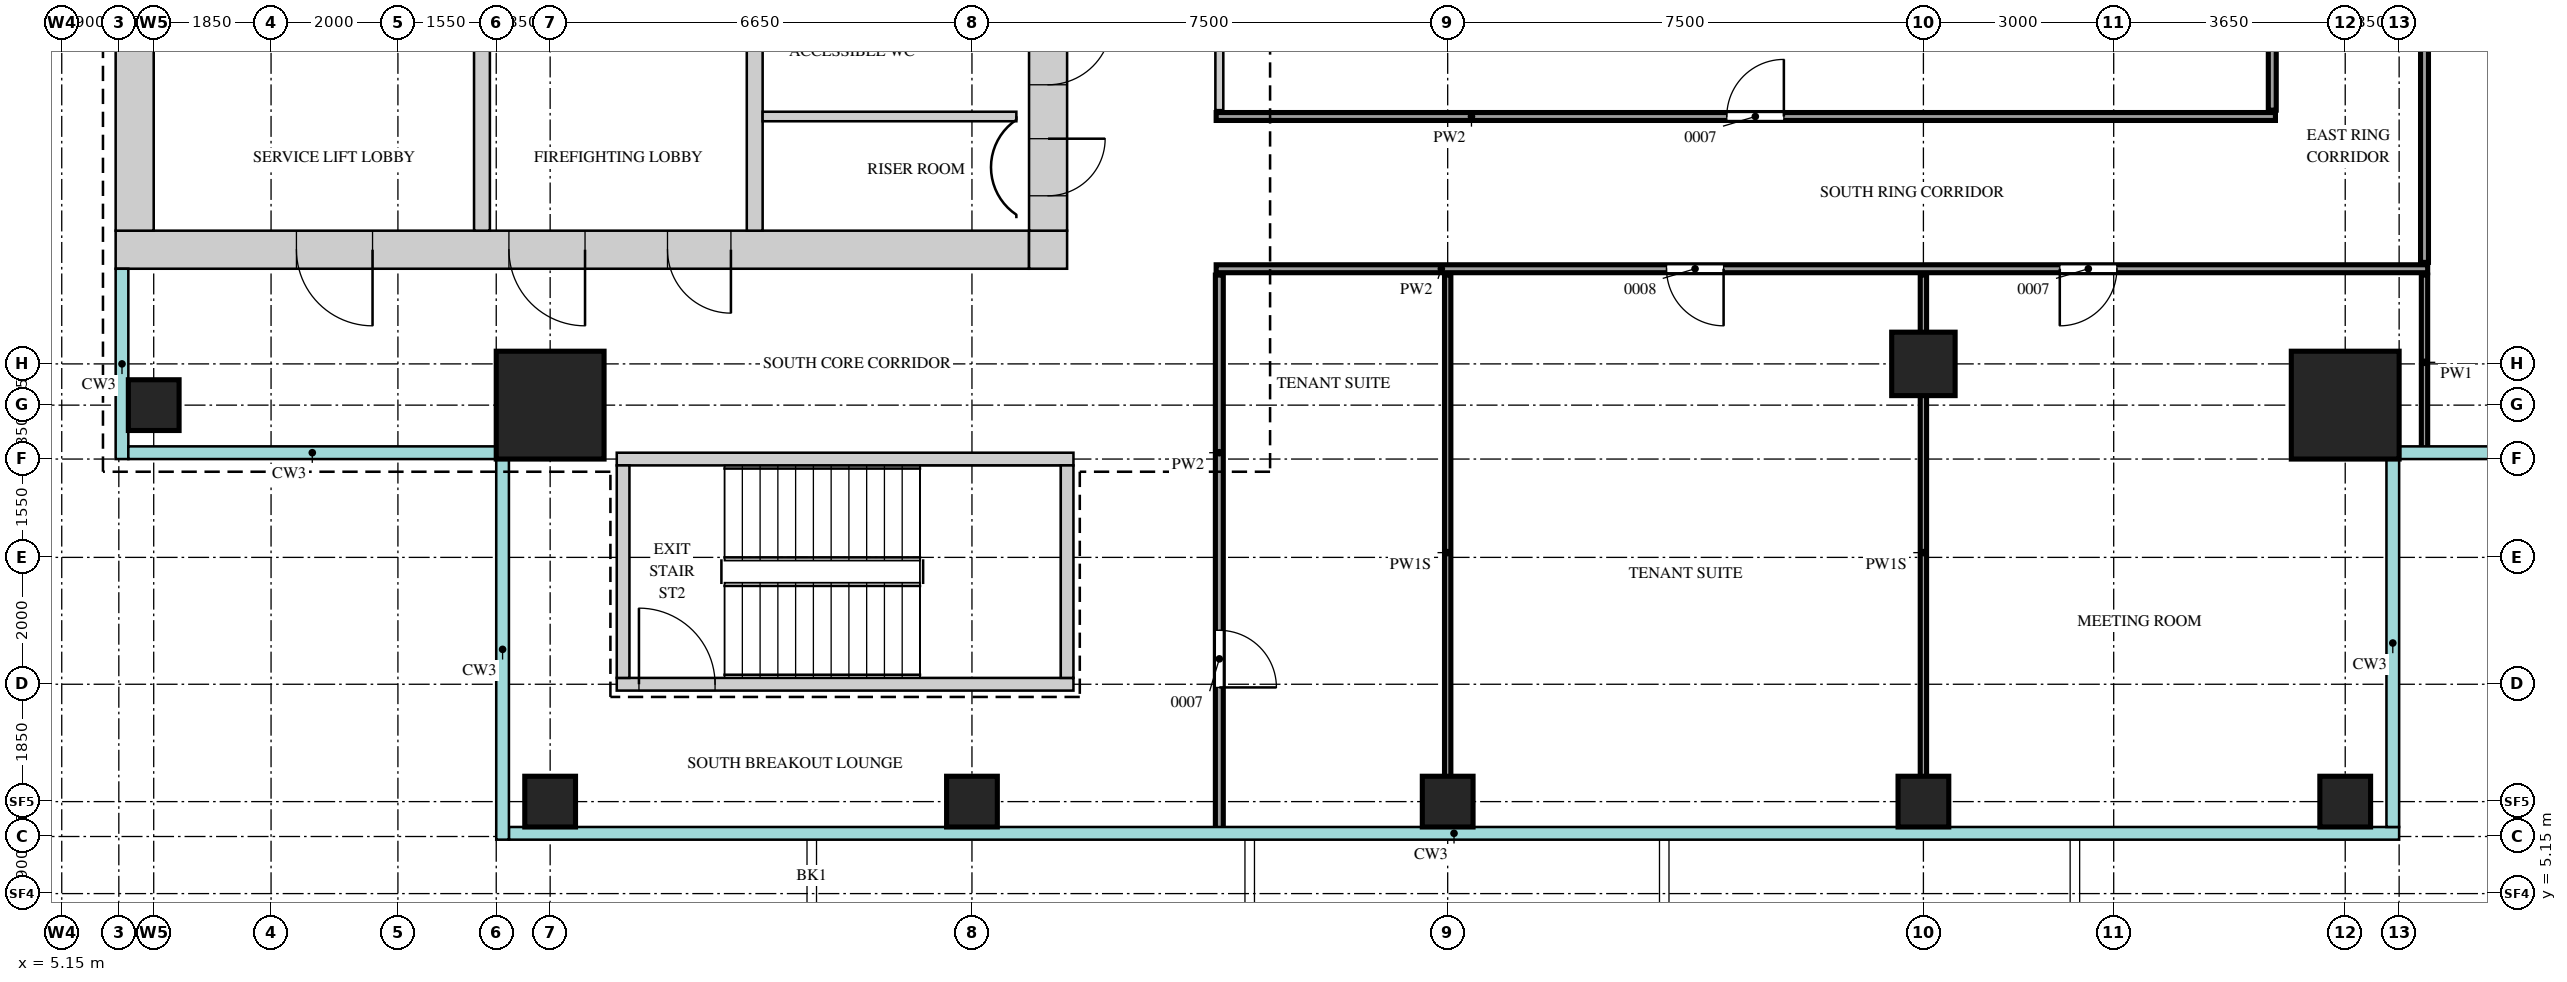
"""IFC4 building model, lengths in metres.
Left out: names, types, materials, properties, quantities, classifications, styles, units other than length and angle.
Written with IfcOpenShell. Run it as: python <this file> out.ifc"""

import sys

from ifc_helpers import new_model, si_unit, direction, frame, frame_2d, origin, origin_2d, place, context, subcontext, project, spatial, rectangle, extrude, source, transform, mapped, element, fill, save


model = new_model("IFC4")
c1 = context("Model", 3, precision=1e-05, world=origin(), true_north=direction((0.0, 1.0)))
c2 = subcontext(c1, "Body", "Model", "MODEL_VIEW")
j1 = project(units=[si_unit("LENGTHUNIT", "METRE"), si_unit("PLANEANGLEUNIT", "RADIAN")], contexts=[c1])
p1 = place(None, origin())
s1 = spatial("IfcSite", under=j1, at=p1, CompositionType="ELEMENT")
p2 = place(p1, origin())
s2 = spatial("IfcBuilding", under=s1, at=p2, CompositionType="ELEMENT")
p3 = place(p2, frame((0.0, 0.0, 286.2)))
s3 = spatial("IfcBuildingStorey", under=s2, at=p3, CompositionType="ELEMENT", Elevation=286.2)
m1 = source(origin(), c2, "Body", "SweptSolid", [
    extrude(rectangle(XDim=14.4, YDim=0.6, at=frame_2d((7.2, 0.0))), origin(), (0.0, 0.0, 1.0), 3.75),
])
p4 = place(p3, frame((6.0, 15.3, 0.0), z_axis=(0.0, 0.0, 1.0), x_axis=(1.0, 0.0, 0.0)))
e1 = element("IfcWall", 1, at=p4, inside=s3, PredefinedType="SHEAR", context=c2, shape_type="MappedRepresentation", body=[
    mapped(m1, transform((0.0, 0.0, 0.0))),
])
m2 = source(origin(), c2, "Body", "SweptSolid", [
    extrude(rectangle(XDim=1.2, YDim=2.1, at=frame_2d((0.6, 1.05))), frame((0.0, 0.31, 0.0), z_axis=(0.0, -1.0, 0.0), x_axis=(1.0, 0.0, 0.0)), (0.0, 0.0, 1.0), 0.62),
])
p5 = place(p4, frame((6.2, 0.0, 0.0)))
e2 = element("IfcOpeningElement", 2, at=p5, cuts=e1, PredefinedType="OPENING", context=c2, shape_type="MappedRepresentation", body=[
    mapped(m2, transform((0.0, 0.0, 0.0))),
])
p6 = place(p4, frame((2.85, 0.0, 0.0)))
e3 = element("IfcOpeningElement", 3, at=p6, cuts=e1, PredefinedType="OPENING", context=c2, shape_type="MappedRepresentation", body=[
    mapped(m2, transform((0.0, 0.0, 0.0))),
])
m3 = source(origin(), c2, "Body", "SweptSolid", [
    extrude(rectangle(XDim=1.0, YDim=2.1, at=frame_2d((0.5, 1.05))), frame((0.0, 0.31, 0.0), z_axis=(0.0, -1.0, 0.0), x_axis=(1.0, 0.0, 0.0)), (0.0, 0.0, 1.0), 0.62),
])
p7 = place(p4, frame((8.7, 0.0, 0.0)))
e4 = element("IfcOpeningElement", 4, at=p7, cuts=e1, PredefinedType="OPENING", context=c2, shape_type="MappedRepresentation", body=[
    mapped(m3, transform((0.0, 0.0, 0.0))),
])
m4 = source(origin(), c2, "Body", "SweptSolid", [
    extrude(rectangle(XDim=0.6, YDim=0.6, at=frame_2d((0.3, 0.0))), origin(), (0.0, 0.0, 1.0), 3.75),
])
p8 = place(p3, frame((20.4, 15.3, 0.0), z_axis=(0.0, 0.0, 1.0), x_axis=(1.0, 0.0, 0.0)))
e5 = element("IfcWall", 5, at=p8, inside=s3, PredefinedType="SHEAR", context=c2, shape_type="MappedRepresentation", body=[
    mapped(m4, transform((0.0, 0.0, 0.0))),
])
m5 = source(origin(), c2, "Body", "SweptSolid", [
    extrude(rectangle(XDim=22.8, YDim=0.6, at=frame_2d((11.4, 0.0))), origin(), (0.0, 0.0, 1.0), 3.75),
])
p9 = place(p3, frame((20.7, 15.6, 0.0), z_axis=(0.0, 0.0, 1.0), x_axis=(0.0, 1.0, 0.0)))
e6 = element("IfcWall", 6, at=p9, inside=s3, PredefinedType="SHEAR", context=c2, shape_type="MappedRepresentation", body=[
    mapped(m5, transform((0.0, 0.0, 0.0))),
])
m6 = source(origin(), c2, "Body", "SweptSolid", [
    extrude(rectangle(XDim=1.8, YDim=2.1, at=frame_2d((0.9, 1.05))), frame((0.0, 0.31, 0.0), z_axis=(0.0, -1.0, 0.0), x_axis=(1.0, 0.0, 0.0)), (0.0, 0.0, 1.0), 0.62),
])
p10 = place(p9, frame((10.9, 0.0, 0.0)))
e7 = element("IfcOpeningElement", 7, at=p10, cuts=e6, PredefinedType="OPENING", context=c2, shape_type="MappedRepresentation", body=[
    mapped(m6, transform((0.0, 0.0, 0.0))),
])
m7 = source(origin(), c2, "Body", "SweptSolid", [
    extrude(rectangle(XDim=0.9, YDim=2.1, at=frame_2d((0.45, 1.05))), frame((0.0, 0.31, 0.0), z_axis=(0.0, -1.0, 0.0), x_axis=(1.0, 0.0, 0.0)), (0.0, 0.0, 1.0), 0.62),
])
p11 = place(p9, frame((0.55, 0.0, 0.0)))
e8 = element("IfcOpeningElement", 8, at=p11, cuts=e6, PredefinedType="OPENING", context=c2, shape_type="MappedRepresentation", body=[
    mapped(m7, transform((0.0, 0.0, 0.0))),
])
p12 = place(p9, frame((2.3, 0.0, 0.0)))
e9 = element("IfcOpeningElement", 9, at=p12, cuts=e6, PredefinedType="OPENING", context=c2, shape_type="MappedRepresentation", body=[
    mapped(m3, transform((0.0, 0.0, 0.0))),
])
p13 = place(p9, frame((5.1, 0.0, 0.0)))
e10 = element("IfcOpeningElement", 10, at=p13, cuts=e6, PredefinedType="OPENING", context=c2, shape_type="MappedRepresentation", body=[
    mapped(m7, transform((0.0, 0.0, 0.0))),
])
p14 = place(p3, frame((6.3, 15.6, 0.0), z_axis=(0.0, 0.0, 1.0), x_axis=(0.0, 1.0, 0.0)))
e11 = element("IfcWall", 11, at=p14, inside=s3, PredefinedType="SHEAR", context=c2, shape_type="MappedRepresentation", body=[
    mapped(m5, transform((0.0, 0.0, 0.0))),
])
m8 = source(origin(), c2, "Body", "SweptSolid", [
    extrude(rectangle(XDim=7.2, YDim=0.2, at=frame_2d((3.6, 0.0))), origin(), (0.0, 0.0, 1.0), 3.75),
])
p15 = place(p3, frame((13.9, 12.0, 0.0), z_axis=(0.0, 0.0, 1.0), x_axis=(1.0, 0.0, 0.0)))
e12 = element("IfcWall", 12, at=p15, inside=s3, PredefinedType="SHEAR", context=c2, shape_type="MappedRepresentation", body=[
    mapped(m8, transform((0.0, 0.0, 0.0))),
])
p16 = place(p3, frame((13.9, 8.45, 0.0), z_axis=(0.0, 0.0, 1.0), x_axis=(1.0, 0.0, 0.0)))
e13 = element("IfcWall", 13, at=p16, inside=s3, PredefinedType="SHEAR", context=c2, shape_type="MappedRepresentation", body=[
    mapped(m8, transform((0.0, 0.0, 0.0))),
])
m9 = source(origin(), c2, "Body", "SweptSolid", [
    extrude(rectangle(XDim=1.2, YDim=2.1, at=frame_2d((0.6, 1.05))), frame((0.0, 0.11, 0.0), z_axis=(0.0, -1.0, 0.0), x_axis=(1.0, 0.0, 0.0)), (0.0, 0.0, 1.0), 0.22),
])
p17 = place(p16, frame((0.35, 0.0, 0.0)))
e14 = element("IfcOpeningElement", 14, at=p17, cuts=e13, PredefinedType="OPENING", context=c2, shape_type="MappedRepresentation", body=[
    mapped(m9, transform((0.0, 0.0, 0.0))),
])
m10 = source(origin(), c2, "Body", "SweptSolid", [
    extrude(rectangle(XDim=3.35, YDim=0.2, at=frame_2d((1.675, 0.0))), origin(), (0.0, 0.0, 1.0), 3.75),
])
for number, where, z_axis, x_axis in (
    (15, (21.0, 8.55, 0.0), (0.0, 0.0, 1.0), (0.0, 1.0, 0.0)),
    (16, (14.0, 8.55, 0.0), (0.0, 0.0, 1.0), (0.0, 1.0, 0.0)),
):
    element("IfcWall", number, at=place(p3, frame(where, z_axis=z_axis, x_axis=x_axis)), inside=s3, PredefinedType="SHEAR", context=c2, shape_type="MappedRepresentation", body=[
        mapped(m10, transform((0.0, 0.0, 0.0))),
    ])
m11 = source(origin(), c2, "Body", "SweptSolid", [
    extrude(rectangle(XDim=3.6, YDim=0.25, at=frame_2d((1.8, 0.0))), origin(), (0.0, 0.0, 1.0), 3.75),
])
for number, where, z_axis, x_axis in (
    (17, (16.075, 15.6, 0.0), (0.0, 0.0, 1.0), (0.0, 1.0, 0.0)),
    (18, (11.775, 15.6, 0.0), (0.0, 0.0, 1.0), (0.0, 1.0, 0.0)),
):
    element("IfcWall", number, at=place(p3, frame(where, z_axis=z_axis, x_axis=x_axis)), inside=s3, PredefinedType="STANDARD", context=c2, shape_type="MappedRepresentation", body=[
        mapped(m11, transform((0.0, 0.0, 0.0))),
    ])
m12 = source(origin(), c2, "Body", "SweptSolid", [
    extrude(rectangle(XDim=1.7, YDim=1.7, at=origin_2d()), origin(), (0.0, 0.0, 1.0), 3.75),
])
for number, where, z_axis, x_axis in (
    (19, (41.15, 12.85, 0.0), (0.0, 0.0, 1.0), (1.0, 0.0, 0.0)),
    (20, (12.85, 12.85, 0.0), (0.0, 0.0, 1.0), (1.0, 0.0, 0.0)),
):
    element("IfcColumn", number, at=place(p3, frame(where, z_axis=z_axis, x_axis=x_axis)), inside=s3, PredefinedType="COLUMN", context=c2, shape_type="MappedRepresentation", body=[
        mapped(m12, transform((0.0, 0.0, 0.0))),
    ])
m13 = source(origin(), c2, "Body", "SweptSolid", [
    extrude(rectangle(XDim=0.8, YDim=0.8, at=origin_2d()), origin(), (0.0, 0.0, 1.0), 3.75),
])
for number, where, z_axis, x_axis in (
    (21, (12.85, 6.6, 0.0), (0.0, 0.0, 1.0), (1.0, 0.0, 0.0)),
    (22, (19.5, 6.6, 0.0), (0.0, 0.0, 1.0), (1.0, 0.0, 0.0)),
    (23, (27.0, 6.6, 0.0), (0.0, 0.0, 1.0), (1.0, 0.0, 0.0)),
    (24, (34.5, 6.6, 0.0), (0.0, 0.0, 1.0), (1.0, 0.0, 0.0)),
    (25, (41.15, 6.6, 0.0), (0.0, 0.0, 1.0), (1.0, 0.0, 0.0)),
    (26, (6.6, 12.85, 0.0), (0.0, 0.0, 1.0), (1.0, 0.0, 0.0)),
):
    element("IfcColumn", number, at=place(p3, frame(where, z_axis=z_axis, x_axis=x_axis)), inside=s3, PredefinedType="COLUMN", context=c2, shape_type="MappedRepresentation", body=[
        mapped(m13, transform((0.0, 0.0, 0.0))),
    ])
m14 = source(origin(), c2, "Body", "SweptSolid", [
    extrude(rectangle(XDim=1.0, YDim=1.0, at=origin_2d()), origin(), (0.0, 0.0, 1.0), 3.75),
])
p18 = place(p3, frame((34.5, 13.5, 0.0), z_axis=(0.0, 0.0, 1.0), x_axis=(1.0, 0.0, 0.0)))
e27 = element("IfcColumn", 27, at=p18, inside=s3, PredefinedType="COLUMN", context=c2, shape_type="MappedRepresentation", body=[
    mapped(m14, transform((0.0, 0.0, 0.0))),
])
m15 = source(origin(), c2, "Body", "SweptSolid", [
    extrude(rectangle(XDim=8.75, YDim=0.125, at=frame_2d((4.375, 0.0))), origin(), (0.0, 0.0, 1.0), 3.8),
])
p19 = place(p3, frame((23.4, 6.15, 0.0), z_axis=(0.0, 0.0, 1.0), x_axis=(0.0, 1.0, 0.0)))
e28 = element("IfcWall", 28, at=p19, inside=s3, PredefinedType="PARTITIONING", context=c2, shape_type="MappedRepresentation", body=[
    mapped(m15, transform((0.0, 0.0, 0.0))),
])
m16 = source(origin(), c2, "Body", "SweptSolid", [
    extrude(rectangle(XDim=0.9, YDim=2.1, at=frame_2d((0.45, 1.05))), frame((0.0, 0.073, 0.0), z_axis=(0.0, -1.0, 0.0), x_axis=(1.0, 0.0, 0.0)), (0.0, 0.0, 1.0), 0.145),
])
p20 = place(p19, frame((2.25, 0.0, 0.0)))
e29 = element("IfcOpeningElement", 29, at=p20, cuts=e28, PredefinedType="OPENING", context=c2, shape_type="MappedRepresentation", body=[
    mapped(m16, transform((0.0, 0.0, 0.0))),
])
m17 = source(origin(), c2, "Body", "SweptSolid", [
    extrude(rectangle(XDim=8.75, YDim=0.1, at=frame_2d((4.375, 0.0))), origin(), (0.0, 0.0, 1.0), 3.35),
])
for number, where, z_axis, x_axis in (
    (30, (27.0, 6.15, 0.0), (0.0, 0.0, 1.0), (0.0, 1.0, 0.0)),
    (31, (34.5, 6.15, 0.0), (0.0, 0.0, 1.0), (0.0, 1.0, 0.0)),
):
    element("IfcWall", number, at=place(p3, frame(where, z_axis=z_axis, x_axis=x_axis)), inside=s3, PredefinedType="PARTITIONING", context=c2, shape_type="MappedRepresentation", body=[
        mapped(m17, transform((0.0, 0.0, 0.0))),
    ])
m18 = source(origin(), c2, "Body", "SweptSolid", [
    extrude(rectangle(XDim=2.75, YDim=0.1, at=frame_2d((1.375, 0.0))), origin(), (0.0, 0.0, 1.0), 3.8),
])
p21 = place(p3, frame((42.4, 12.15, 0.0), z_axis=(0.0, 0.0, 1.0), x_axis=(0.0, 1.0, 0.0)))
e32 = element("IfcWall", 32, at=p21, inside=s3, PredefinedType="PARTITIONING", context=c2, shape_type="MappedRepresentation", body=[
    mapped(m18, transform((0.0, 0.0, 0.0))),
])
m19 = source(origin(), c2, "Body", "SweptSolid", [
    extrude(rectangle(XDim=19.1, YDim=0.125, at=frame_2d((9.55, 0.0))), origin(), (0.0, 0.0, 1.0), 3.8),
])
p22 = place(p3, frame((23.35, 15.0, 0.0), z_axis=(0.0, 0.0, 1.0), x_axis=(1.0, 0.0, 0.0)))
e33 = element("IfcWall", 33, at=p22, inside=s3, PredefinedType="PARTITIONING", context=c2, shape_type="MappedRepresentation", body=[
    mapped(m19, transform((0.0, 0.0, 0.0))),
])
p23 = place(p22, frame((7.1, 0.0, 0.0)))
e34 = element("IfcOpeningElement", 34, at=p23, cuts=e33, PredefinedType="OPENING", context=c2, shape_type="MappedRepresentation", body=[
    mapped(m16, transform((0.0, 0.0, 0.0))),
])
p24 = place(p22, frame((13.3, 0.0, 0.0)))
e35 = element("IfcOpeningElement", 35, at=p24, cuts=e33, PredefinedType="OPENING", context=c2, shape_type="MappedRepresentation", body=[
    mapped(m16, transform((0.0, 0.0, 0.0))),
])
m20 = source(origin(), c2, "Body", "SweptSolid", [
    extrude(rectangle(XDim=23.8, YDim=0.125, at=frame_2d((11.9, 0.0))), origin(), (0.0, 0.0, 1.0), 3.8),
])
p25 = place(p3, frame((42.4, 15.1, 0.0), z_axis=(0.0, 0.0, 1.0), x_axis=(0.0, 1.0, 0.0)))
e36 = element("IfcWall", 36, at=p25, inside=s3, PredefinedType="PARTITIONING", context=c2, shape_type="MappedRepresentation", body=[
    mapped(m20, transform((0.0, 0.0, 0.0))),
])
p26 = place(p25, frame((5.3, 0.0, 0.0)))
e37 = element("IfcOpeningElement", 37, at=p26, cuts=e36, PredefinedType="OPENING", context=c2, shape_type="MappedRepresentation", body=[
    mapped(m16, transform((0.0, 0.0, 0.0))),
])
p27 = place(p25, frame((15.35, 0.0, 0.0)))
e38 = element("IfcOpeningElement", 38, at=p27, cuts=e36, PredefinedType="OPENING", context=c2, shape_type="MappedRepresentation", body=[
    mapped(m16, transform((0.0, 0.0, 0.0))),
])
p28 = place(p25, frame((21.05, 0.0, 0.0)))
e39 = element("IfcOpeningElement", 39, at=p28, cuts=e36, PredefinedType="OPENING", context=c2, shape_type="MappedRepresentation", body=[
    mapped(m16, transform((0.0, 0.0, 0.0))),
])
m21 = source(origin(), c2, "Body", "SweptSolid", [
    extrude(rectangle(XDim=4.0, YDim=0.15, at=frame_2d((2.0, 0.0))), origin(), (0.0, 0.0, 1.0), 3.8),
])
p29 = place(p3, frame((16.2, 17.4, 0.0), z_axis=(0.0, 0.0, 1.0), x_axis=(1.0, 0.0, 0.0)))
e40 = element("IfcWall", 40, at=p29, inside=s3, PredefinedType="PARTITIONING", context=c2, shape_type="MappedRepresentation", body=[
    mapped(m21, transform((0.0, 0.0, 0.0))),
])
m22 = source(origin(), c2, "Body", "SweptSolid", [
    extrude(rectangle(XDim=16.7, YDim=0.125, at=frame_2d((8.35, 0.0))), origin(), (0.0, 0.0, 1.0), 3.8),
])
p30 = place(p3, frame((23.35, 17.4, 0.0), z_axis=(0.0, 0.0, 1.0), x_axis=(1.0, 0.0, 0.0)))
e41 = element("IfcWall", 41, at=p30, inside=s3, PredefinedType="PARTITIONING", context=c2, shape_type="MappedRepresentation", body=[
    mapped(m22, transform((0.0, 0.0, 0.0))),
])
p31 = place(p30, frame((8.05, 0.0, 0.0)))
e42 = element("IfcOpeningElement", 42, at=p31, cuts=e41, PredefinedType="OPENING", context=c2, shape_type="MappedRepresentation", body=[
    mapped(m16, transform((0.0, 0.0, 0.0))),
])
m23 = source(origin(), c2, "Body", "SweptSolid", [
    extrude(rectangle(XDim=19.0, YDim=0.125, at=frame_2d((9.5, 0.0))), origin(), (0.0, 0.0, 1.0), 3.8),
])
p32 = place(p3, frame((23.4, 17.5, 0.0), z_axis=(0.0, 0.0, 1.0), x_axis=(0.0, 1.0, 0.0)))
e43 = element("IfcWall", 43, at=p32, inside=s3, PredefinedType="PARTITIONING", context=c2, shape_type="MappedRepresentation", body=[
    mapped(m23, transform((0.0, 0.0, 0.0))),
])
p33 = place(p32, frame((9.4, 0.0, 0.0)))
e44 = element("IfcOpeningElement", 44, at=p33, cuts=e43, PredefinedType="OPENING", context=c2, shape_type="MappedRepresentation", body=[
    mapped(m16, transform((0.0, 0.0, 0.0))),
])
p34 = place(p3, frame((40.0, 17.5, 0.0), z_axis=(0.0, 0.0, 1.0), x_axis=(0.0, 1.0, 0.0)))
e45 = element("IfcWall", 45, at=p34, inside=s3, PredefinedType="PARTITIONING", context=c2, shape_type="MappedRepresentation", body=[
    mapped(m23, transform((0.0, 0.0, 0.0))),
])
m24 = source(origin(), c2, "Body", "SweptSolid", [
    extrude(rectangle(XDim=0.9, YDim=2.1, at=frame_2d((0.45, 1.05))), frame((0.0, 0.25, 0.0), z_axis=(0.0, -1.0, 0.0), x_axis=(1.0, 0.0, 0.0)), (0.0, 0.0, 1.0), 0.5),
])
p35 = place(p11, origin())
e46 = element("IfcDoor", 46, at=p35, inside=s3, OperationType="SINGLE_SWING_RIGHT", PredefinedType="DOOR", context=c2, shape_type="MappedRepresentation", body=[
    mapped(m24, transform((0.0, 0.0, 0.0))),
])
fill(e8, e46)
m25 = source(origin(), c2, "Body", "SweptSolid", [
    extrude(rectangle(XDim=1.0, YDim=2.1, at=frame_2d((0.5, 1.05))), frame((0.0, 0.25, 0.0), z_axis=(0.0, -1.0, 0.0), x_axis=(1.0, 0.0, 0.0)), (0.0, 0.0, 1.0), 0.5),
])
p36 = place(p12, origin())
e47 = element("IfcDoor", 47, at=p36, inside=s3, OperationType="SINGLE_SWING_RIGHT", PredefinedType="DOOR", context=c2, shape_type="MappedRepresentation", body=[
    mapped(m25, transform((0.0, 0.0, 0.0))),
])
fill(e9, e47)
m26 = source(origin(), c2, "Body", "SweptSolid", [
    extrude(rectangle(XDim=1.2, YDim=2.1, at=frame_2d((0.6, 1.05))), frame((0.0, 0.25, 0.0), z_axis=(0.0, -1.0, 0.0), x_axis=(1.0, 0.0, 0.0)), (0.0, 0.0, 1.0), 0.5),
])
p37 = place(p5, origin())
e48 = element("IfcDoor", 48, at=p37, inside=s3, OperationType="SINGLE_SWING_RIGHT", PredefinedType="DOOR", context=c2, shape_type="MappedRepresentation", body=[
    mapped(m26, transform((0.0, 0.0, 0.0))),
])
fill(e2, e48)
p38 = place(p6, origin())
e49 = element("IfcDoor", 49, at=p38, inside=s3, OperationType="SINGLE_SWING_RIGHT", PredefinedType="DOOR", context=c2, shape_type="MappedRepresentation", body=[
    mapped(m26, transform((0.0, 0.0, 0.0))),
])
fill(e3, e49)
p39 = place(p7, origin())
e50 = element("IfcDoor", 50, at=p39, inside=s3, OperationType="SINGLE_SWING_RIGHT", PredefinedType="DOOR", context=c2, shape_type="MappedRepresentation", body=[
    mapped(m25, transform((0.0, 0.0, 0.0))),
])
fill(e4, e50)
m27 = source(origin(), c2, "Body", "SweptSolid", [
    extrude(rectangle(XDim=0.9, YDim=2.1, at=frame_2d((0.45, 1.05))), frame((0.0, 0.025, 0.0), z_axis=(0.0, -1.0, 0.0), x_axis=(1.0, 0.0, 0.0)), (0.0, 0.0, 1.0), 0.05),
])
p40 = place(p20, origin())
e51 = element("IfcDoor", 51, at=p40, inside=s3, OperationType="SINGLE_SWING_LEFT", PredefinedType="DOOR", context=c2, shape_type="MappedRepresentation", body=[
    mapped(m27, transform((0.0, 0.0, 0.0))),
])
fill(e29, e51)
p41 = place(p23, origin())
e52 = element("IfcDoor", 52, at=p41, inside=s3, OperationType="SINGLE_SWING_RIGHT", PredefinedType="DOOR", context=c2, shape_type="MappedRepresentation", body=[
    mapped(m27, transform((0.0, 0.0, 0.0))),
])
fill(e34, e52)
p42 = place(p24, origin())
e53 = element("IfcDoor", 53, at=p42, inside=s3, OperationType="SINGLE_SWING_LEFT", PredefinedType="DOOR", context=c2, shape_type="MappedRepresentation", body=[
    mapped(m27, transform((0.0, 0.0, 0.0))),
])
fill(e35, e53)
p43 = place(p31, origin())
e54 = element("IfcDoor", 54, at=p43, inside=s3, OperationType="SINGLE_SWING_LEFT", PredefinedType="DOOR", context=c2, shape_type="MappedRepresentation", body=[
    mapped(m27, transform((0.0, 0.0, 0.0))),
])
fill(e42, e54)
m28 = source(origin(), c2, "Body", "SweptSolid", [
    extrude(rectangle(XDim=1.2, YDim=2.1, at=frame_2d((0.6, 1.05))), frame((0.0, 0.025, 0.0), z_axis=(0.0, -1.0, 0.0), x_axis=(1.0, 0.0, 0.0)), (0.0, 0.0, 1.0), 0.05),
])
p44 = place(p17, origin())
e55 = element("IfcDoor", 55, at=p44, inside=s3, OperationType="SINGLE_SWING_RIGHT", PredefinedType="DOOR", context=c2, shape_type="MappedRepresentation", body=[
    mapped(m28, transform((0.0, 0.0, 0.0))),
])
fill(e14, e55)
save(model, sys.argv[1])
